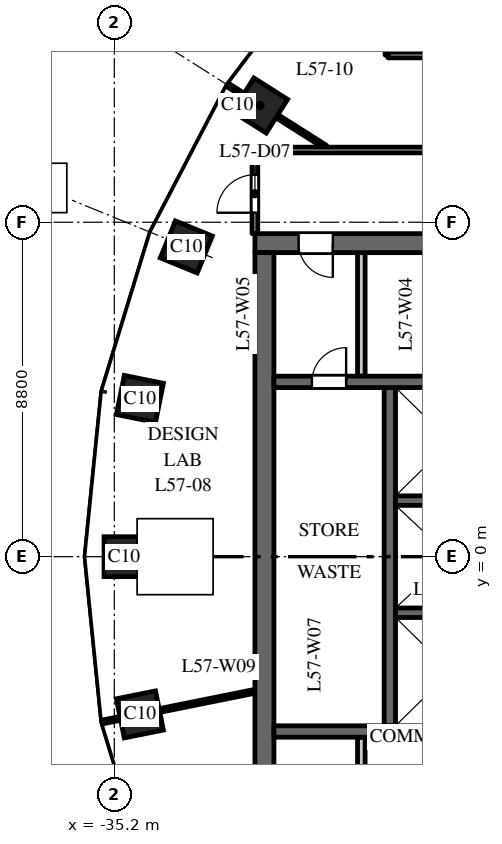
"""IFC4 building model, lengths in metres.
Left out: names, types, materials, properties, quantities, classifications, styles, units other than length and angle.
Written with IfcOpenShell. Run it as: python <this file> out.ifc"""

import sys

from ifc_helpers import new_model, si_unit, direction, frame, frame_2d, origin, origin_2d, place, context, subcontext, project, spatial, rectangle, extrude, element, fill, save


model = new_model("IFC4")
c1 = context("Model", 3, precision=1e-05, world=origin(), true_north=direction((0.0, 1.0)))
c2 = subcontext(c1, "Body", "Model", "MODEL_VIEW")
j1 = project(units=[si_unit("LENGTHUNIT", "METRE"), si_unit("PLANEANGLEUNIT", "RADIAN")], contexts=[c1])
p1 = place(None, origin())
s1 = spatial("IfcSite", under=j1, at=p1, CompositionType="ELEMENT")
p2 = place(p1, origin())
s2 = spatial("IfcBuilding", under=s1, at=p2, CompositionType="ELEMENT")
p3 = place(p2, frame((0.0, 0.0, 269.5)))
s3 = spatial("IfcBuildingStorey", under=s2, at=p3, CompositionType="ELEMENT", Elevation=269.5)
for number, where, z_axis, x_axis in (
    (1, (-31.365, 11.871, 0.0), (0.0, 0.0, 1.0), (-0.535, -0.845, 0.0)),
    (2, (-33.305, 8.149, 0.0), (0.0, 0.0, 1.0), (-0.379, -0.925, 0.0)),
    (3, (-34.527, 4.151, 0.0), (0.0, 0.0, 1.0), (-0.197, -0.98, 0.0)),
    (4, (-34.945, 0.0, 0.0), (0.0, 0.0, 1.0), (0.0, -1.0, 0.0)),
    (5, (-34.527, -4.151, 0.0), (0.0, 0.0, 1.0), (0.197, -0.98, 0.0)),
):
    element("IfcColumn", number, at=place(p3, frame(where, z_axis=z_axis, x_axis=x_axis)), inside=s3, PredefinedType="COLUMN", context=c2, shape_type="SweptSolid", body=[
        extrude(rectangle(XDim=1.05, YDim=1.05, at=origin_2d()), origin(), (0.0, 0.0, 1.0), 4.0),
    ])
p4 = place(p3, frame((-16.5, 8.25, 0.0), z_axis=(0.0, 0.0, 1.0), x_axis=(-1.0, 0.0, 0.0)))
e6 = element("IfcWall", 6, at=p4, inside=s3, PredefinedType="SHEAR", context=c2, shape_type="SweptSolid", body=[
    extrude(rectangle(XDim=15.0, YDim=0.5, at=frame_2d((7.5, 0.0))), origin(), (0.0, 0.0, 1.0), 3.7),
])
p5 = place(p4, frame((6.9, 0.0, 0.0)))
e7 = element("IfcOpeningElement", 7, at=p5, cuts=e6, PredefinedType="OPENING", context=c2, shape_type="SweptSolid", body=[
    extrude(rectangle(XDim=1.2, YDim=2.1, at=frame_2d((0.6, 1.05))), frame((0.0, 0.26, 0.0), z_axis=(0.0, -1.0, 0.0), x_axis=(1.0, 0.0, 0.0)), (0.0, 0.0, 1.0), 0.52),
])
p6 = place(p4, frame((12.95, 0.0, 0.0)))
e8 = element("IfcOpeningElement", 8, at=p6, cuts=e6, PredefinedType="OPENING", context=c2, shape_type="SweptSolid", body=[
    extrude(rectangle(XDim=0.9, YDim=2.1, at=frame_2d((0.45, 1.05))), frame((0.0, 0.26, 0.0), z_axis=(0.0, -1.0, 0.0), x_axis=(1.0, 0.0, 0.0)), (0.0, 0.0, 1.0), 0.52),
])
p7 = place(p3, frame((-27.95, -4.45, 0.0), z_axis=(0.0, 0.0, 1.0), x_axis=(0.0, 1.0, 0.0)))
e9 = element("IfcWall", 9, at=p7, inside=s3, PredefinedType="SHEAR", context=c2, shape_type="SweptSolid", body=[
    extrude(rectangle(XDim=8.9, YDim=0.3, at=frame_2d((4.45, 0.0))), origin(), (0.0, 0.0, 1.0), 3.7),
])
p8 = place(p3, frame((-31.25, -8.0, 0.0), z_axis=(0.0, 0.0, 1.0), x_axis=(0.0, 1.0, 0.0)))
e10 = element("IfcWall", 10, at=p8, inside=s3, PredefinedType="SHEAR", context=c2, shape_type="SweptSolid", body=[
    extrude(rectangle(XDim=16.0, YDim=0.5, at=frame_2d((8.0, 0.0))), origin(), (0.0, 0.0, 1.0), 3.7),
])
p9 = place(p3, frame((-24.9, 4.6, 0.0), z_axis=(0.0, 0.0, 1.0), x_axis=(-1.0, 0.0, 0.0)))
e11 = element("IfcWall", 11, at=p9, inside=s3, PredefinedType="SHEAR", context=c2, shape_type="SweptSolid", body=[
    extrude(rectangle(XDim=6.1, YDim=0.3, at=frame_2d((3.05, 0.0))), origin(), (0.0, 0.0, 1.0), 3.7),
])
p10 = place(p9, frame((4.2, 0.0, 0.0)))
e12 = element("IfcOpeningElement", 12, at=p10, cuts=e11, PredefinedType="OPENING", context=c2, shape_type="SweptSolid", body=[
    extrude(rectangle(XDim=0.9, YDim=2.1, at=frame_2d((0.45, 1.05))), frame((0.0, 0.16, 0.0), z_axis=(0.0, -1.0, 0.0), x_axis=(1.0, 0.0, 0.0)), (0.0, 0.0, 1.0), 0.32),
])
for number, where, z_axis, x_axis in (
    (13, (-28.7, 4.75, 0.0), (0.0, 0.0, 1.0), (0.0, 1.0, 0.0)),
    (14, (-28.7, -8.0, 0.0), (0.0, 0.0, 1.0), (0.0, 1.0, 0.0)),
):
    element("IfcWall", number, at=place(p3, frame(where, z_axis=z_axis, x_axis=x_axis)), inside=s3, PredefinedType="PARTITIONING", context=c2, shape_type="SweptSolid", body=[
        extrude(rectangle(XDim=3.25, YDim=0.2, at=frame_2d((1.625, 0.0))), origin(), (0.0, 0.0, 1.0), 3.7),
    ])
p11 = place(p3, frame((-24.9, -4.6, 0.0), z_axis=(0.0, 0.0, 1.0), x_axis=(-1.0, 0.0, 0.0)))
e15 = element("IfcWall", 15, at=p11, inside=s3, PredefinedType="SHEAR", context=c2, shape_type="SweptSolid", body=[
    extrude(rectangle(XDim=6.1, YDim=0.3, at=frame_2d((3.05, 0.0))), origin(), (0.0, 0.0, 1.0), 3.7),
])
for number, where, z_axis, x_axis in (
    (16, (-24.9, -1.475, 0.0), (0.0, 0.0, 1.0), (-1.0, 0.0, 0.0)),
    (17, (-24.9, 1.475, 0.0), (0.0, 0.0, 1.0), (-1.0, 0.0, 0.0)),
):
    element("IfcWall", number, at=place(p3, frame(where, z_axis=z_axis, x_axis=x_axis)), inside=s3, PredefinedType="SHEAR", context=c2, shape_type="SweptSolid", body=[
        extrude(rectangle(XDim=2.9, YDim=0.25, at=frame_2d((1.45, 0.0))), origin(), (0.0, 0.0, 1.0), 3.7),
    ])
p12 = place(p3, frame((-35.512, -4.349, 0.0), z_axis=(0.0, 0.0, 1.0), x_axis=(0.980357474535, 0.197228857227, 0.0)))
e18 = element("IfcWall", 18, at=p12, inside=s3, PredefinedType="PARTITIONING", context=c2, shape_type="SweptSolid", body=[
    extrude(rectangle(XDim=4.092, YDim=0.1, at=frame_2d((2.046, 0.0))), origin(), (0.0, 0.0, 1.0), 3.2),
])
p13 = place(p3, frame((-32.212, 12.408, 0.0), z_axis=(0.0, 0.0, 1.0), x_axis=(0.844810627195, -0.535065420467, 0.0)))
e19 = element("IfcWall", 19, at=p13, inside=s3, PredefinedType="PARTITIONING", context=c2, shape_type="SweptSolid", body=[
    extrude(rectangle(XDim=3.048, YDim=0.1, at=frame_2d((1.524, 0.0))), origin(), (0.0, 0.0, 1.0), 3.7),
])
p14 = place(p3, frame((-31.5, 8.5, 0.0), z_axis=(0.0, 0.0, 1.0), x_axis=(0.0, 1.0, 0.0)))
e20 = element("IfcWall", 20, at=p14, inside=s3, PredefinedType="PARTITIONING", context=c2, shape_type="SweptSolid", body=[
    extrude(rectangle(XDim=2.2, YDim=0.15, at=frame_2d((1.1, 0.0))), origin(), (0.0, 0.0, 1.0), 3.7),
])
p15 = place(p14, frame((0.55, 0.0, 0.0)))
e21 = element("IfcOpeningElement", 21, at=p15, cuts=e20, PredefinedType="OPENING", context=c2, shape_type="SweptSolid", body=[
    extrude(rectangle(XDim=1.0, YDim=2.1, at=frame_2d((0.5, 1.05))), frame((0.0, 0.085, 0.0), z_axis=(0.0, -1.0, 0.0), x_axis=(1.0, 0.0, 0.0)), (0.0, 0.0, 1.0), 0.17),
])
p16 = place(p3, frame((-31.5, 10.7, 0.0), z_axis=(0.0, 0.0, 1.0), x_axis=(1.0, 0.0, 0.0)))
e22 = element("IfcWall", 22, at=p16, inside=s3, PredefinedType="PARTITIONING", context=c2, shape_type="SweptSolid", body=[
    extrude(rectangle(XDim=15.0, YDim=0.15, at=frame_2d((7.5, 0.0))), origin(), (0.0, 0.0, 1.0), 3.1),
])
p17 = place(p16, frame((6.405, 0.0, 0.0)))
e23 = element("IfcOpeningElement", 23, at=p17, cuts=e22, PredefinedType="OPENING", context=c2, shape_type="SweptSolid", body=[
    extrude(rectangle(XDim=1.0, YDim=2.1, at=frame_2d((0.5, 1.05))), frame((0.0, 0.085, 0.0), z_axis=(0.0, -1.0, 0.0), x_axis=(1.0, 0.0, 0.0)), (0.0, 0.0, 1.0), 0.17),
])
p18 = place(p16, frame((13.1, 0.0, 0.0)))
e24 = element("IfcOpeningElement", 24, at=p18, cuts=e22, PredefinedType="OPENING", context=c2, shape_type="SweptSolid", body=[
    extrude(rectangle(XDim=1.0, YDim=2.1, at=frame_2d((0.5, 1.05))), frame((0.0, 0.085, 0.0), z_axis=(0.0, -1.0, 0.0), x_axis=(1.0, 0.0, 0.0)), (0.0, 0.0, 1.0), 0.17),
])
p19 = place(p3, frame((-28.0, 13.2, 0.0), z_axis=(0.0, 0.0, 1.0), x_axis=(0.0, 1.0, 0.0)))
e25 = element("IfcWall", 25, at=p19, inside=s3, PredefinedType="PARTITIONING", context=c2, shape_type="SweptSolid", body=[
    extrude(rectangle(XDim=2.6, YDim=0.15, at=frame_2d((1.3, 0.0))), origin(), (0.0, 0.0, 1.0), 3.0),
])
p20 = place(p3, frame((-28.0, 13.2, 0.0), z_axis=(0.0, 0.0, 1.0), x_axis=(1.0, 0.0, 0.0)))
e26 = element("IfcWall", 26, at=p20, inside=s3, PredefinedType="PARTITIONING", context=c2, shape_type="SweptSolid", body=[
    extrude(rectangle(XDim=9.347, YDim=0.15, at=frame_2d((4.673, 0.0))), origin(), (0.0, 0.0, 1.0), 2.75),
])
p21 = place(p6, origin())
e27 = element("IfcDoor", 27, at=p21, inside=s3, OperationType="SINGLE_SWING_RIGHT", PredefinedType="DOOR", context=c2, shape_type="SweptSolid", body=[
    extrude(rectangle(XDim=0.9, YDim=2.1, at=frame_2d((0.45, 1.05))), frame((0.0, 0.025, 0.0), z_axis=(0.0, -1.0, 0.0), x_axis=(1.0, 0.0, 0.0)), (0.0, 0.0, 1.0), 0.05),
])
fill(e8, e27)
p22 = place(p10, origin())
e28 = element("IfcDoor", 28, at=p22, inside=s3, OperationType="SINGLE_SWING_LEFT", PredefinedType="DOOR", context=c2, shape_type="SweptSolid", body=[
    extrude(rectangle(XDim=0.9, YDim=2.1, at=frame_2d((0.45, 1.05))), frame((0.0, 0.025, 0.0), z_axis=(0.0, -1.0, 0.0), x_axis=(1.0, 0.0, 0.0)), (0.0, 0.0, 1.0), 0.05),
])
fill(e12, e28)
p23 = place(p15, origin())
e29 = element("IfcDoor", 29, at=p23, inside=s3, OperationType="SINGLE_SWING_LEFT", PredefinedType="DOOR", context=c2, shape_type="SweptSolid", body=[
    extrude(rectangle(XDim=1.0, YDim=2.1, at=frame_2d((0.5, 1.05))), frame((0.0, 0.025, 0.0), z_axis=(0.0, -1.0, 0.0), x_axis=(1.0, 0.0, 0.0)), (0.0, 0.0, 1.0), 0.05),
])
fill(e21, e29)
save(model, sys.argv[1])
